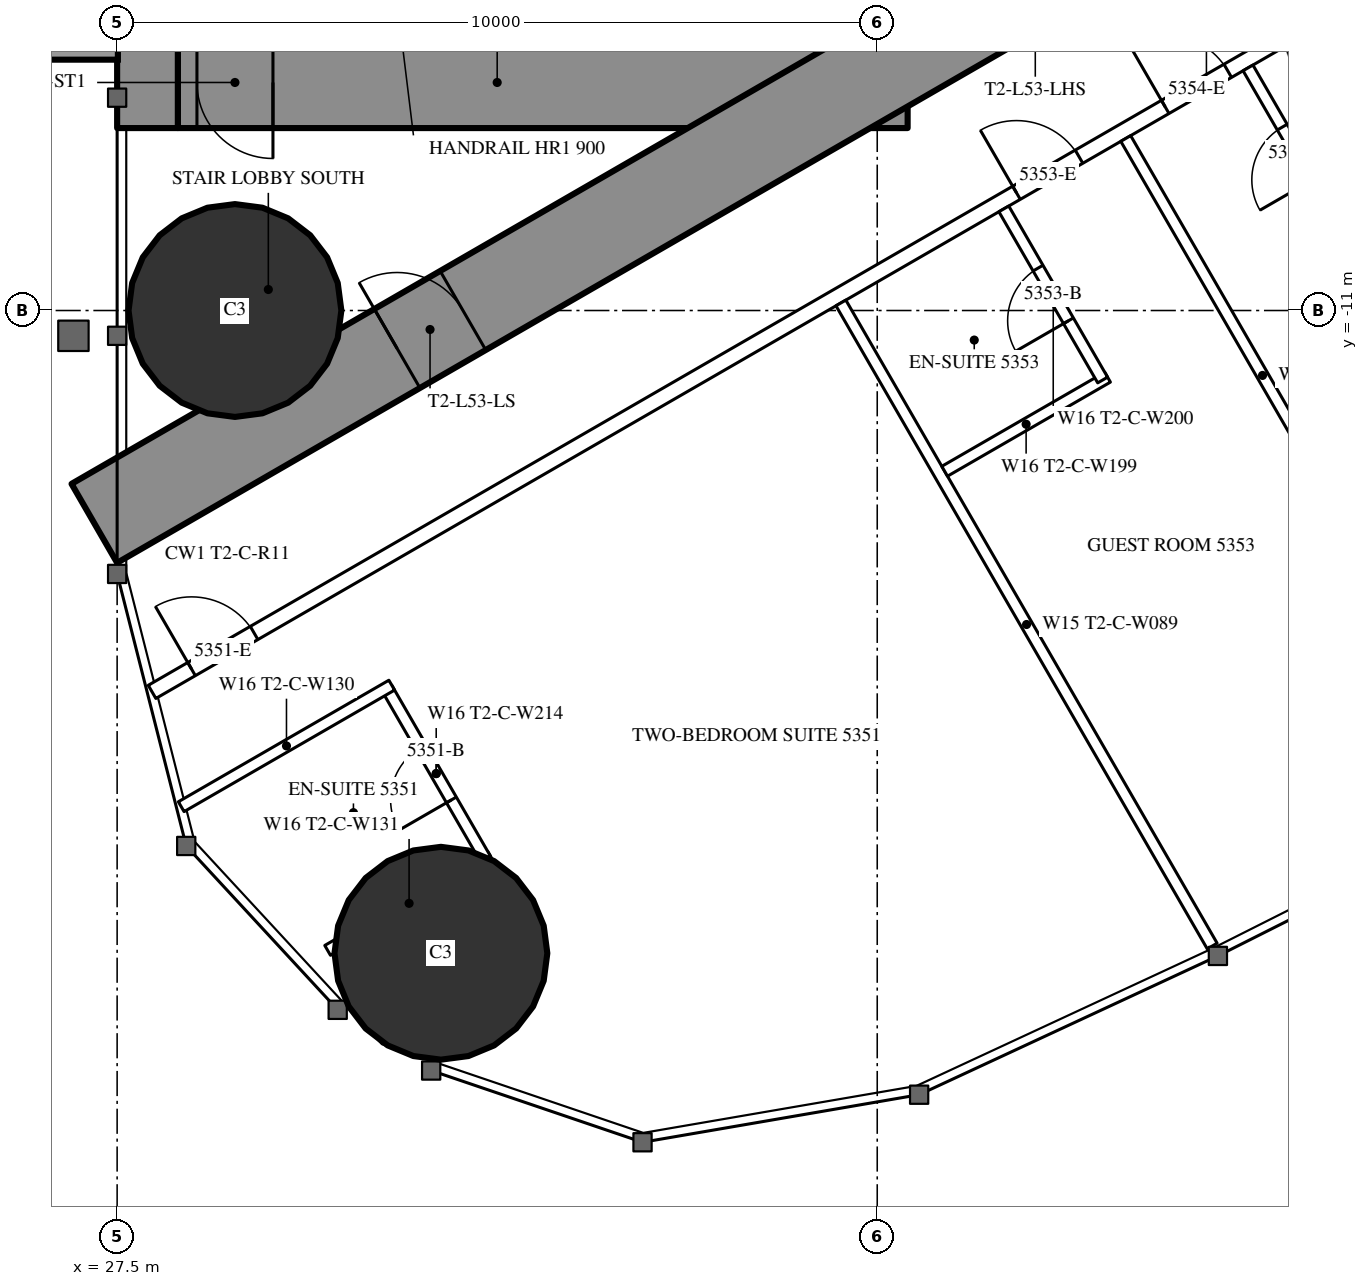
"""IFC4 building model, lengths in metres.
Left out: names, types, materials, properties, quantities, classifications, styles, units other than length and angle.
Written with IfcOpenShell. Run it as: python <this file> out.ifc"""

import sys

from ifc_helpers import new_model, si_unit, direction, frame, frame_2d, origin, origin_2d, place, context, subcontext, project, spatial, rectangle, circle, extrude, element, fill, save


model = new_model("IFC4")
c1 = context("Model", 3, precision=1e-05, world=origin(), true_north=direction((0.0, 1.0)))
c2 = subcontext(c1, "Body", "Model", "MODEL_VIEW")
j1 = project(units=[si_unit("LENGTHUNIT", "METRE"), si_unit("PLANEANGLEUNIT", "RADIAN")], contexts=[c1])
p1 = place(None, origin())
s1 = spatial("IfcSite", under=j1, at=p1, CompositionType="ELEMENT")
p2 = place(p1, origin())
s2 = spatial("IfcBuilding", under=s1, at=p2, CompositionType="ELEMENT")
p3 = place(p2, frame((0.0, 0.0, 198.3)))
s3 = spatial("IfcBuildingStorey", under=s2, at=p3, CompositionType="ELEMENT", Elevation=198.3)
for number, where, z_axis, x_axis in (
    (1, (31.76, -19.456, 0.0), (0.0, 0.0, 1.0), (1.0, 0.0, 0.0)),
    (2, (29.05, -11.0, 0.0), (0.0, 0.0, 1.0), (1.0, 0.0, 0.0)),
):
    element("IfcColumn", number, at=place(p3, frame(where, z_axis=z_axis, x_axis=x_axis)), inside=s3, PredefinedType="COLUMN", context=c2, shape_type="SweptSolid", body=[
        extrude(circle(Radius=1.4, at=origin_2d()), origin(), (0.0, 0.0, 1.0), 3.5),
    ])
p4 = place(p3, frame((27.9, -8.6, 0.0), z_axis=(0.0, 0.0, 1.0), x_axis=(0.0, 1.0, 0.0)))
e3 = element("IfcWall", 3, at=p4, inside=s3, PredefinedType="SHEAR", context=c2, shape_type="SweptSolid", body=[
    extrude(rectangle(XDim=17.2, YDim=0.8, at=frame_2d((8.6, 0.0))), origin(), (0.0, 0.0, 1.0), 3.5),
])
p5 = place(p4, frame((2.45, 0.0, 0.6)))
e4 = element("IfcOpeningElement", 4, at=p5, cuts=e3, PredefinedType="OPENING", context=c2, shape_type="SweptSolid", body=[
    extrude(rectangle(XDim=0.6, YDim=2.1, at=frame_2d((0.3, 1.05))), frame((0.0, 0.41, 0.0), z_axis=(0.0, -1.0, 0.0), x_axis=(1.0, 0.0, 0.0)), (0.0, 0.0, 1.0), 0.82),
])
p6 = place(p4, frame((14.15, 0.0, 0.6)))
e5 = element("IfcOpeningElement", 5, at=p6, cuts=e3, PredefinedType="OPENING", context=c2, shape_type="SweptSolid", body=[
    extrude(rectangle(XDim=0.6, YDim=2.1, at=frame_2d((0.3, 1.05))), frame((0.0, 0.41, 0.0), z_axis=(0.0, -1.0, 0.0), x_axis=(1.0, 0.0, 0.0)), (0.0, 0.0, 1.0), 0.82),
])
p7 = place(p3, frame((37.3, -8.6, 0.0), z_axis=(0.0, 0.0, 1.0), x_axis=(0.0, 1.0, 0.0)))
e6 = element("IfcWall", 6, at=p7, inside=s3, PredefinedType="SHEAR", context=c2, shape_type="SweptSolid", body=[
    extrude(rectangle(XDim=17.2, YDim=1.2, at=frame_2d((8.6, 0.0))), origin(), (0.0, 0.0, 1.0), 3.5),
])
p8 = place(p7, frame((7.7, 0.0, 0.0)))
e7 = element("IfcOpeningElement", 7, at=p8, cuts=e6, PredefinedType="OPENING", context=c2, shape_type="SweptSolid", body=[
    extrude(rectangle(XDim=1.8, YDim=2.2, at=frame_2d((0.9, 1.1))), frame((0.0, 0.61, 0.0), z_axis=(0.0, -1.0, 0.0), x_axis=(1.0, 0.0, 0.0)), (0.0, 0.0, 1.0), 1.22),
])
p9 = place(p3, frame((28.3, -8.0, 0.0), z_axis=(0.0, 0.0, 1.0), x_axis=(1.0, 0.0, 0.0)))
e8 = element("IfcWall", 8, at=p9, inside=s3, PredefinedType="SHEAR", context=c2, shape_type="SweptSolid", body=[
    extrude(rectangle(XDim=8.4, YDim=1.2, at=frame_2d((4.2, 0.0))), origin(), (0.0, 0.0, 1.0), 3.5),
])
p10 = place(p9, frame((0.25, 0.0, 0.0)))
e9 = element("IfcOpeningElement", 9, at=p10, cuts=e8, PredefinedType="OPENING", context=c2, shape_type="SweptSolid", body=[
    extrude(rectangle(XDim=1.0, YDim=2.2, at=frame_2d((0.5, 1.1))), frame((0.0, 0.61, 0.0), z_axis=(0.0, -1.0, 0.0), x_axis=(1.0, 0.0, 0.0)), (0.0, 0.0, 1.0), 1.22),
])
p11 = place(p3, frame((27.2, -13.8, 0.0), z_axis=(0.0, 0.0, 1.0), x_axis=(0.866027159892, 0.499996958321, 0.0)))
e10 = element("IfcWall", 10, at=p11, inside=s3, PredefinedType="SHEAR", context=c2, shape_type="SweptSolid", body=[
    extrude(rectangle(XDim=27.947, YDim=1.2, at=frame_2d((13.973, 0.0))), origin(), (0.0, 0.0, 1.0), 3.5),
])
p12 = place(p11, frame((4.6, 0.0, 0.0)))
e11 = element("IfcOpeningElement", 11, at=p12, cuts=e10, PredefinedType="OPENING", context=c2, shape_type="SweptSolid", body=[
    extrude(rectangle(XDim=1.0, YDim=2.2, at=frame_2d((0.5, 1.1))), frame((0.0, 0.61, 0.0), z_axis=(0.0, -1.0, 0.0), x_axis=(1.0, 0.0, 0.0)), (0.0, 0.0, 1.0), 1.22),
])
p13 = place(p11, frame((13.395, 0.0, 0.0)))
e12 = element("IfcOpeningElement", 12, at=p13, cuts=e10, PredefinedType="OPENING", context=c2, shape_type="SweptSolid", body=[
    extrude(rectangle(XDim=1.8, YDim=2.2, at=frame_2d((0.9, 1.1))), frame((0.0, 0.61, 0.0), z_axis=(0.0, -1.0, 0.0), x_axis=(1.0, 0.0, 0.0)), (0.0, 0.0, 1.0), 1.22),
])
p14 = place(p3, frame((27.959, -16.017, 0.0), z_axis=(0.0, 0.0, 1.0), x_axis=(0.866024151371, 0.500002169237, 0.0)))
e13 = element("IfcWall", 13, at=p14, inside=s3, PredefinedType="PARTITIONING", context=c2, shape_type="SweptSolid", body=[
    extrude(rectangle(XDim=32.034, YDim=0.2, at=frame_2d((16.017, 0.0))), origin(), (0.0, 0.0, 1.0), 3.25),
])
p15 = place(p14, frame((0.6, 0.0, 0.0)))
e14 = element("IfcOpeningElement", 14, at=p15, cuts=e13, PredefinedType="OPENING", context=c2, shape_type="SweptSolid", body=[
    extrude(rectangle(XDim=0.95, YDim=2.2, at=frame_2d((0.475, 1.1))), frame((0.0, 0.11, 0.0), z_axis=(0.0, -1.0, 0.0), x_axis=(1.0, 0.0, 0.0)), (0.0, 0.0, 1.0), 0.22),
])
p16 = place(p14, frame((13.132, 0.0, 0.0)))
e15 = element("IfcOpeningElement", 15, at=p16, cuts=e13, PredefinedType="OPENING", context=c2, shape_type="SweptSolid", body=[
    extrude(rectangle(XDim=0.95, YDim=2.2, at=frame_2d((0.475, 1.1))), frame((0.0, 0.11, 0.0), z_axis=(0.0, -1.0, 0.0), x_axis=(1.0, 0.0, 0.0)), (0.0, 0.0, 1.0), 0.22),
])
p17 = place(p14, frame((15.391, 0.0, 0.0)))
e16 = element("IfcOpeningElement", 16, at=p17, cuts=e13, PredefinedType="OPENING", context=c2, shape_type="SweptSolid", body=[
    extrude(rectangle(XDim=0.95, YDim=2.2, at=frame_2d((0.475, 1.1))), frame((0.0, 0.11, 0.0), z_axis=(0.0, -1.0, 0.0), x_axis=(1.0, 0.0, 0.0)), (0.0, 0.0, 1.0), 0.22),
])
p18 = place(p14, frame((19.441, 0.0, 0.0)))
e17 = element("IfcOpeningElement", 17, at=p18, cuts=e13, PredefinedType="OPENING", context=c2, shape_type="SweptSolid", body=[
    extrude(rectangle(XDim=0.95, YDim=2.2, at=frame_2d((0.475, 1.1))), frame((0.0, 0.11, 0.0), z_axis=(0.0, -1.0, 0.0), x_axis=(1.0, 0.0, 0.0)), (0.0, 0.0, 1.0), 0.22),
])
p19 = place(p14, frame((26.406, 0.0, 0.0)))
e18 = element("IfcOpeningElement", 18, at=p19, cuts=e13, PredefinedType="OPENING", context=c2, shape_type="SweptSolid", body=[
    extrude(rectangle(XDim=0.95, YDim=2.2, at=frame_2d((0.475, 1.1))), frame((0.0, 0.11, 0.0), z_axis=(0.0, -1.0, 0.0), x_axis=(1.0, 0.0, 0.0)), (0.0, 0.0, 1.0), 0.22),
])
p20 = place(p14, frame((28.87, 0.0, 0.0)))
e19 = element("IfcOpeningElement", 19, at=p20, cuts=e13, PredefinedType="OPENING", context=c2, shape_type="SweptSolid", body=[
    extrude(rectangle(XDim=1.8, YDim=2.2, at=frame_2d((0.9, 1.1))), frame((0.0, 0.11, 0.0), z_axis=(0.0, -1.0, 0.0), x_axis=(1.0, 0.0, 0.0)), (0.0, 0.0, 1.0), 0.22),
])
p21 = place(p3, frame((37.022, -10.9, 0.0), z_axis=(0.0, 0.0, 1.0), x_axis=(0.499998620953, -0.866026199976, 0.0)))
e20 = element("IfcWall", 20, at=p21, inside=s3, PredefinedType="PARTITIONING", context=c2, shape_type="SweptSolid", body=[
    extrude(rectangle(XDim=9.77, YDim=0.15, at=frame_2d((4.885, 0.0))), origin(), (0.0, 0.0, 1.0), 3.25),
])
p22 = place(p3, frame((40.769, -8.737, 0.0), z_axis=(0.0, 0.0, 1.0), x_axis=(0.500013115284, -0.866017831539, 0.0)))
e21 = element("IfcWall", 21, at=p22, inside=s3, PredefinedType="PARTITIONING", context=c2, shape_type="SweptSolid", body=[
    extrude(rectangle(XDim=7.198, YDim=0.15, at=frame_2d((3.599, 0.0))), origin(), (0.0, 0.0, 1.0), 2.3),
])
p23 = place(p3, frame((30.269, -19.418, 0.0), z_axis=(0.0, 0.0, 1.0), x_axis=(0.866006523861, 0.500032699561, 0.0)))
e22 = element("IfcWall", 22, at=p23, inside=s3, PredefinedType="PARTITIONING", context=c2, shape_type="SweptSolid", body=[
    extrude(rectangle(XDim=2.475, YDim=0.15, at=frame_2d((1.237, 0.0))), origin(), (0.0, 0.0, 1.0), 3.25),
])
p24 = place(p3, frame((31.048, -15.966, 0.0), z_axis=(0.0, 0.0, 1.0), x_axis=(0.499936506574, -0.866062058628, 0.0)))
e23 = element("IfcWall", 23, at=p24, inside=s3, PredefinedType="PARTITIONING", context=c2, shape_type="SweptSolid", body=[
    extrude(rectangle(XDim=2.6, YDim=0.15, at=frame_2d((1.3, 0.0))), origin(), (0.0, 0.0, 1.0), 3.25),
])
p25 = place(p24, frame((0.9, 0.0, 0.0)))
e24 = element("IfcOpeningElement", 24, at=p25, cuts=e23, PredefinedType="OPENING", context=c2, shape_type="SweptSolid", body=[
    extrude(rectangle(XDim=0.8, YDim=2.2, at=frame_2d((0.4, 1.1))), frame((0.0, 0.085, 0.0), z_axis=(0.0, -1.0, 0.0), x_axis=(1.0, 0.0, 0.0)), (0.0, 0.0, 1.0), 0.17),
])
p26 = place(p3, frame((28.343, -17.528, 0.0), z_axis=(0.0, 0.0, 1.0), x_axis=(0.86600760081, 0.500030834389, 0.0)))
e25 = element("IfcWall", 25, at=p26, inside=s3, PredefinedType="PARTITIONING", context=c2, shape_type="SweptSolid", body=[
    extrude(rectangle(XDim=3.198, YDim=0.15, at=frame_2d((1.599, 0.0))), origin(), (0.0, 0.0, 1.0), 3.25),
])
p27 = place(p3, frame((38.387, -13.115, 0.0), z_axis=(0.0, 0.0, 1.0), x_axis=(0.866073894602, 0.499916002032, 0.0)))
e26 = element("IfcWall", 26, at=p27, inside=s3, PredefinedType="PARTITIONING", context=c2, shape_type="SweptSolid", body=[
    extrude(rectangle(XDim=2.475, YDim=0.15, at=frame_2d((1.238, 0.0))), origin(), (0.0, 0.0, 1.0), 3.25),
])
p28 = place(p3, frame((39.166, -9.663, 0.0), z_axis=(0.0, 0.0, 1.0), x_axis=(0.500006934395, -0.866021400173, 0.0)))
e27 = element("IfcWall", 27, at=p28, inside=s3, PredefinedType="PARTITIONING", context=c2, shape_type="SweptSolid", body=[
    extrude(rectangle(XDim=2.6, YDim=0.15, at=frame_2d((1.3, 0.0))), origin(), (0.0, 0.0, 1.0), 3.25),
])
p29 = place(p28, frame((0.9, 0.0, 0.0)))
e28 = element("IfcOpeningElement", 28, at=p29, cuts=e27, PredefinedType="OPENING", context=c2, shape_type="SweptSolid", body=[
    extrude(rectangle(XDim=0.8, YDim=2.2, at=frame_2d((0.4, 1.1))), frame((0.0, 0.085, 0.0), z_axis=(0.0, -1.0, 0.0), x_axis=(1.0, 0.0, 0.0)), (0.0, 0.0, 1.0), 0.17),
])
p30 = place(p3, frame((42.378, -7.808, 0.0), z_axis=(0.0, 0.0, 1.0), x_axis=(0.500006934395, -0.866021400173, 0.0)))
e29 = element("IfcWall", 29, at=p30, inside=s3, PredefinedType="PARTITIONING", context=c2, shape_type="SweptSolid", body=[
    extrude(rectangle(XDim=2.6, YDim=0.15, at=frame_2d((1.3, 0.0))), origin(), (0.0, 0.0, 1.0), 3.25),
])
p31 = place(p30, frame((0.9, 0.0, 0.0)))
e30 = element("IfcOpeningElement", 30, at=p31, cuts=e29, PredefinedType="OPENING", context=c2, shape_type="SweptSolid", body=[
    extrude(rectangle(XDim=0.8, YDim=2.2, at=frame_2d((0.4, 1.1))), frame((0.0, 0.085, 0.0), z_axis=(0.0, -1.0, 0.0), x_axis=(1.0, 0.0, 0.0)), (0.0, 0.0, 1.0), 0.17),
])
p32 = place(p25, origin())
e31 = element("IfcDoor", 31, at=p32, inside=s3, OperationType="SINGLE_SWING_RIGHT", PredefinedType="DOOR", context=c2, shape_type="SweptSolid", body=[
    extrude(rectangle(XDim=0.8, YDim=2.2, at=frame_2d((0.4, 1.1))), frame((0.0, 0.025, 0.0), z_axis=(0.0, -1.0, 0.0), x_axis=(1.0, 0.0, 0.0)), (0.0, 0.0, 1.0), 0.05),
])
fill(e24, e31)
p33 = place(p15, origin())
e32 = element("IfcDoor", 32, at=p33, inside=s3, OperationType="SINGLE_SWING_LEFT", PredefinedType="DOOR", context=c2, shape_type="SweptSolid", body=[
    extrude(rectangle(XDim=0.95, YDim=2.2, at=frame_2d((0.475, 1.1))), frame((0.0, 0.025, 0.0), z_axis=(0.0, -1.0, 0.0), x_axis=(1.0, 0.0, 0.0)), (0.0, 0.0, 1.0), 0.05),
])
fill(e14, e32)
p34 = place(p29, origin())
e33 = element("IfcDoor", 33, at=p34, inside=s3, OperationType="SINGLE_SWING_RIGHT", PredefinedType="DOOR", context=c2, shape_type="SweptSolid", body=[
    extrude(rectangle(XDim=0.8, YDim=2.2, at=frame_2d((0.4, 1.1))), frame((0.0, 0.025, 0.0), z_axis=(0.0, -1.0, 0.0), x_axis=(1.0, 0.0, 0.0)), (0.0, 0.0, 1.0), 0.05),
])
fill(e28, e33)
p35 = place(p16, origin())
e34 = element("IfcDoor", 34, at=p35, inside=s3, OperationType="SINGLE_SWING_LEFT", PredefinedType="DOOR", context=c2, shape_type="SweptSolid", body=[
    extrude(rectangle(XDim=0.95, YDim=2.2, at=frame_2d((0.475, 1.1))), frame((0.0, 0.025, 0.0), z_axis=(0.0, -1.0, 0.0), x_axis=(1.0, 0.0, 0.0)), (0.0, 0.0, 1.0), 0.05),
])
fill(e15, e34)
p36 = place(p31, origin())
e35 = element("IfcDoor", 35, at=p36, inside=s3, OperationType="SINGLE_SWING_RIGHT", PredefinedType="DOOR", context=c2, shape_type="SweptSolid", body=[
    extrude(rectangle(XDim=0.8, YDim=2.2, at=frame_2d((0.4, 1.1))), frame((0.0, 0.025, 0.0), z_axis=(0.0, -1.0, 0.0), x_axis=(1.0, 0.0, 0.0)), (0.0, 0.0, 1.0), 0.05),
])
fill(e30, e35)
p37 = place(p17, origin())
e36 = element("IfcDoor", 36, at=p37, inside=s3, OperationType="SINGLE_SWING_LEFT", PredefinedType="DOOR", context=c2, shape_type="SweptSolid", body=[
    extrude(rectangle(XDim=0.95, YDim=2.2, at=frame_2d((0.475, 1.1))), frame((0.0, 0.025, 0.0), z_axis=(0.0, -1.0, 0.0), x_axis=(1.0, 0.0, 0.0)), (0.0, 0.0, 1.0), 0.05),
])
fill(e16, e36)
p38 = place(p12, origin())
e37 = element("IfcDoor", 37, at=p38, inside=s3, OperationType="SINGLE_SWING_LEFT", PredefinedType="DOOR", context=c2, shape_type="SweptSolid", body=[
    extrude(rectangle(XDim=1.0, YDim=2.2, at=frame_2d((0.5, 1.1))), frame((0.0, 0.025, 0.0), z_axis=(0.0, -1.0, 0.0), x_axis=(1.0, 0.0, 0.0)), (0.0, 0.0, 1.0), 0.05),
])
fill(e11, e37)
p39 = place(p10, origin())
e38 = element("IfcDoor", 38, at=p39, inside=s3, OperationType="SINGLE_SWING_RIGHT", PredefinedType="DOOR", context=c2, shape_type="SweptSolid", body=[
    extrude(rectangle(XDim=1.0, YDim=2.2, at=frame_2d((0.5, 1.1))), frame((0.0, 0.025, 0.0), z_axis=(0.0, -1.0, 0.0), x_axis=(1.0, 0.0, 0.0)), (0.0, 0.0, 1.0), 0.05),
])
fill(e9, e38)
save(model, sys.argv[1])
